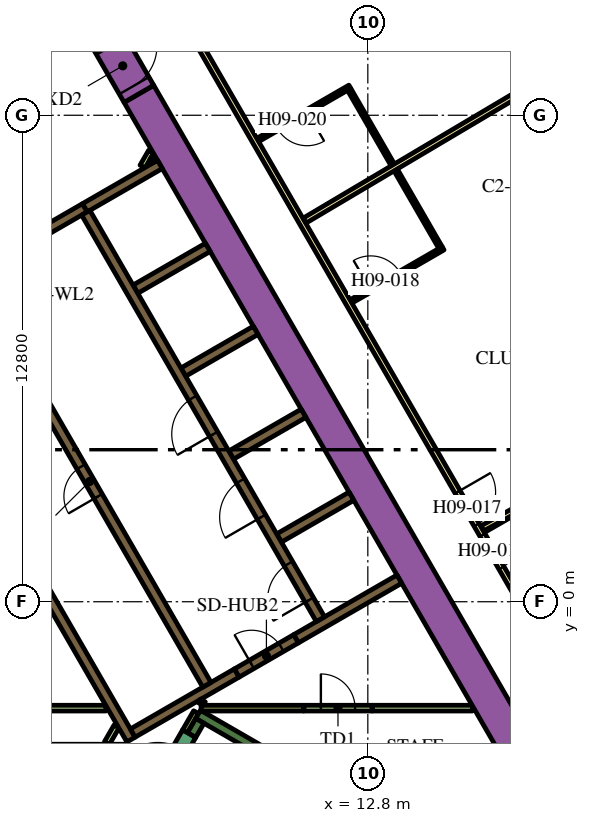
"""IFC4 building model, lengths in metres.
Left out: names, types, materials, properties, quantities, classifications, styles, units other than length and angle.
Written with IfcOpenShell. Run it as: python <this file> out.ifc"""

import sys

from ifc_helpers import new_model, si_unit, direction, frame, frame_2d, origin, place, context, subcontext, project, spatial, polyline, rectangle, outline, extrude, element, fill, save


model = new_model("IFC4")
c1 = context("Model", 3, precision=1e-05, world=origin(), true_north=direction((0.0, 1.0)))
c2 = subcontext(c1, "Body", "Model", "MODEL_VIEW")
j1 = project(units=[si_unit("LENGTHUNIT", "METRE"), si_unit("PLANEANGLEUNIT", "RADIAN")], contexts=[c1])
p1 = place(None, origin())
s1 = spatial("IfcSite", under=j1, at=p1, CompositionType="ELEMENT")
p2 = place(p1, origin())
s2 = spatial("IfcBuilding", under=s1, at=p2, CompositionType="ELEMENT")
p3 = place(p2, frame((0.0, 0.0, 126.6)))
s3 = spatial("IfcBuildingStorey", under=s2, at=p3, CompositionType="ELEMENT", Elevation=126.6)
p4 = place(p3, frame((6.776, 13.364, 0.0), z_axis=(0.0, 0.0, 1.0), x_axis=(0.500004177138, -0.8660229921, 0.0)))
e1 = element("IfcWall", 1, at=p4, inside=s3, PredefinedType="SOLIDWALL", context=c2, shape_type="SweptSolid", body=[
    extrude(rectangle(XDim=20.204, YDim=0.9, at=frame_2d((10.102, 0.0))), origin(), (0.0, 0.0, 1.0), 3.9),
])
p5 = place(p3, frame((8.334, -2.964, 0.0), z_axis=(0.0, 0.0, 1.0), x_axis=(0.866016039709, -0.500016218704, 0.0)))
e2 = element("IfcWall", 2, at=p5, inside=s3, PredefinedType="SOLIDWALL", context=c2, shape_type="SweptSolid", body=[
    extrude(rectangle(XDim=7.05, YDim=0.25, at=frame_2d((3.525, 0.0))), origin(), (0.0, 0.0, 1.0), 3.9),
])
p6 = place(p3, frame((8.163, -3.511, 0.0), z_axis=(0.0, 0.0, 1.0), x_axis=(0.500127794843, 0.865951608824, 0.0)))
e3 = element("IfcWall", 3, at=p6, inside=s3, PredefinedType="SOLIDWALL", context=c2, shape_type="SweptSolid", body=[
    extrude(rectangle(XDim=0.435, YDim=0.25, at=frame_2d((0.217, 0.0))), origin(), (0.0, 0.0, 1.0), 3.9),
])
p7 = place(p3, frame((10.464, 1.677, 0.0), z_axis=(0.0, 0.0, 1.0), x_axis=(0.86605622881, 0.499946605688, 0.0)))
e4 = element("IfcWall", 4, at=p7, inside=s3, PredefinedType="SOLIDWALL", context=c2, shape_type="SweptSolid", body=[
    extrude(rectangle(XDim=2.2, YDim=0.25, at=frame_2d((1.1, 0.0))), origin(), (0.0, 0.0, 1.0), 3.9),
])
p8 = place(p3, origin())
e5 = element("IfcWall", 5, at=p8, inside=s3, PredefinedType="SOLIDWALL", context=c2, shape_type="SweptSolid", body=[
    extrude(outline(polyline([(0.335, 6.925), (0.335, 6.925), (0.335, 7.075), (0.335, 7.075), (0.335, 7.075), (0.245, 7.075), (0.079, 7.363), (0.035, 7.439), (0.252, 7.564), (0.377, 7.348), (6.552, -3.348), (6.677, -3.564), (6.46, -3.689), (4.897, -0.981), (0.332, 6.925), (0.335, 6.925), (0.335, 6.925)])), origin(), (0.0, 0.0, 1.0), 3.9),
])
p9 = place(p3, frame((4.358, 9.791, 0.0), z_axis=(0.0, 0.0, 1.0), x_axis=(0.866079547155, 0.499906209203, 0.0)))
e6 = element("IfcWall", 6, at=p9, inside=s3, PredefinedType="SOLIDWALL", context=c2, shape_type="SweptSolid", body=[
    extrude(rectangle(XDim=1.15, YDim=0.25, at=frame_2d((0.575, 0.0))), origin(), (0.0, 0.0, 1.0), 3.9),
])
p10 = place(p3, frame((5.356, 10.367, 0.0), z_axis=(0.0, 0.0, 1.0), x_axis=(0.865978535641, 0.50008116922, 0.0)))
e7 = element("IfcWall", 7, at=p10, inside=s3, PredefinedType="SOLIDWALL", context=c2, shape_type="SweptSolid", body=[
    extrude(rectangle(XDim=2.278, YDim=0.25, at=frame_2d((1.139, 0.0))), origin(), (0.0, 0.0, 1.0), 3.9),
])
p11 = place(p3, frame((9.352, -1.875, 0.0), z_axis=(0.0, 0.0, 1.0), x_axis=(-0.866024844342, -0.500000968981, 0.0)))
e8 = element("IfcWall", 8, at=p11, inside=s3, PredefinedType="SOLIDWALL", context=c2, shape_type="SweptSolid", body=[
    extrude(rectangle(XDim=3.162, YDim=0.25, at=frame_2d((1.581, 0.0))), origin(), (0.0, 0.0, 1.0), 3.9),
])
for number, where, z_axis, x_axis in (
    (9, (6.684, 8.224, 0.0), (0.0, 0.0, 1.0), (0.866, 0.5, 0.0)),
    (10, (7.944, 6.041, 0.0), (0.0, 0.0, 1.0), (0.866, 0.5, 0.0)),
    (11, (9.204, 3.859, 0.0), (0.0, 0.0, 1.0), (0.866, 0.5, 0.0)),
):
    element("IfcWall", number, at=place(p3, frame(where, z_axis=z_axis, x_axis=x_axis)), inside=s3, PredefinedType="SOLIDWALL", context=c2, shape_type="SweptSolid", body=[
        extrude(rectangle(XDim=2.2, YDim=0.25, at=frame_2d((1.1, 0.0))), origin(), (0.0, 0.0, 1.0), 3.9),
    ])
p12 = place(p3, frame((10.911, -0.975, 0.0), z_axis=(0.0, 0.0, 1.0), x_axis=(0.866046979468, 0.499962627957, 0.0)))
e12 = element("IfcWall", 12, at=p12, inside=s3, PredefinedType="SOLIDWALL", context=c2, shape_type="SweptSolid", body=[
    extrude(rectangle(XDim=3.138, YDim=0.25, at=frame_2d((1.569, 0.0))), origin(), (0.0, 0.0, 1.0), 3.9),
])
p13 = place(p3, frame((5.936, -3.718, 0.0), z_axis=(0.0, 0.0, 1.0), x_axis=(0.499890179513, 0.866088799389, 0.0)))
e13 = element("IfcWall", 13, at=p13, inside=s3, PredefinedType="PARTITIONING", context=c2, shape_type="SweptSolid", body=[
    extrude(rectangle(XDim=0.504, YDim=0.15, at=frame_2d((0.252, 0.0))), origin(), (0.0, 0.0, 1.0), 2.75),
])
p14 = place(p3, frame((8.412, -2.8, 0.0), z_axis=(0.0, 0.0, 1.0), x_axis=(1.0, 0.0, 0.0)))
e14 = element("IfcWall", 14, at=p14, inside=s3, PredefinedType="PARTITIONING", context=c2, shape_type="SweptSolid", body=[
    extrude(rectangle(XDim=2.702, YDim=0.15, at=frame_2d((1.351, 0.0))), origin(), (0.0, 0.0, 1.0), 3.9),
])
p15 = place(p3, frame((8.459, -2.599, 0.0), z_axis=(0.0, 0.0, 1.0), x_axis=(-0.501919277433, -0.864914469148, 0.0)))
e15 = element("IfcWall", 15, at=p15, inside=s3, PredefinedType="PARTITIONING", context=c2, shape_type="SweptSolid", body=[
    extrude(rectangle(XDim=0.109, YDim=0.15, at=frame_2d((0.054, 0.0))), origin(), (0.0, 0.0, 1.0), 3.9),
])
p16 = place(p3, frame((8.281, -2.907, 0.0), z_axis=(0.0, 0.0, 1.0), x_axis=(-0.500193841991, -0.86591346013, 0.0)))
e16 = element("IfcWall", 16, at=p16, inside=s3, PredefinedType="PARTITIONING", context=c2, shape_type="SweptSolid", body=[
    extrude(rectangle(XDim=0.583, YDim=0.15, at=frame_2d((0.292, 0.0))), origin(), (0.0, 0.0, 1.0), 3.9),
])
p17 = place(p3, frame((3.238, -2.8, 0.0), z_axis=(0.0, 0.0, 1.0), x_axis=(1.0, 0.0, 0.0)))
e17 = element("IfcWall", 17, at=p17, inside=s3, PredefinedType="PARTITIONING", context=c2, shape_type="SweptSolid", body=[
    extrude(rectangle(XDim=2.672, YDim=0.15, at=frame_2d((1.336, 0.0))), origin(), (0.0, 0.0, 1.0), 2.75),
])
p18 = place(p3, frame((12.915, -2.8, 0.0), z_axis=(0.0, 0.0, 1.0), x_axis=(1.0, 0.0, 0.0)))
e18 = element("IfcWall", 18, at=p18, inside=s3, PredefinedType="PARTITIONING", context=c2, shape_type="SweptSolid", body=[
    extrude(rectangle(XDim=2.637, YDim=0.15, at=frame_2d((1.318, 0.0))), origin(), (0.0, 0.0, 1.0), 2.75),
])
p19 = place(p3, frame((6.872, 11.45, 0.0), z_axis=(0.0, 0.0, 1.0), x_axis=(0.499846793097, 0.866113839764, 0.0)))
e19 = element("IfcWall", 19, at=p19, inside=s3, PredefinedType="PARTITIONING", context=c2, shape_type="SweptSolid", body=[
    extrude(rectangle(XDim=0.453, YDim=0.15, at=frame_2d((0.227, 0.0))), origin(), (0.0, 0.0, 1.0), 2.75),
])
p20 = place(p3, frame((7.131, 11.6, 0.0), z_axis=(0.0, 0.0, 1.0), x_axis=(0.498600033135, 0.866832167699, 0.0)))
e20 = element("IfcWall", 20, at=p20, inside=s3, PredefinedType="PARTITIONING", context=c2, shape_type="SweptSolid", body=[
    extrude(rectangle(XDim=0.107, YDim=0.15, at=frame_2d((0.053, 0.0))), origin(), (0.0, 0.0, 1.0), 2.75),
])
p21 = place(p3, frame((11.553, -0.46, 0.0), z_axis=(0.0, 0.0, 1.0), x_axis=(-0.500006514828, 0.866021642414, 0.0)))
e21 = element("IfcWall", 21, at=p21, inside=s3, PredefinedType="SOLIDWALL", context=c2, shape_type="SweptSolid", body=[
    extrude(rectangle(XDim=12.35, YDim=0.25, at=frame_2d((6.175, 0.0))), origin(), (0.0, 0.0, 1.0), 3.9),
])
p22 = place(p21, frame((0.585, 0.0, 0.0)))
e22 = element("IfcOpeningElement", 22, at=p22, cuts=e21, PredefinedType="OPENING", context=c2, shape_type="SweptSolid", body=[
    extrude(rectangle(XDim=1.1, YDim=2.1, at=frame_2d((0.55, 1.05))), frame((0.0, 0.135, 0.0), z_axis=(0.0, -1.0, 0.0), x_axis=(1.0, 0.0, 0.0)), (0.0, 0.0, 1.0), 0.27),
])
p23 = place(p21, frame((3.105, 0.0, 0.0)))
e23 = element("IfcOpeningElement", 23, at=p23, cuts=e21, PredefinedType="OPENING", context=c2, shape_type="SweptSolid", body=[
    extrude(rectangle(XDim=1.1, YDim=2.1, at=frame_2d((0.55, 1.05))), frame((0.0, 0.135, 0.0), z_axis=(0.0, -1.0, 0.0), x_axis=(1.0, 0.0, 0.0)), (0.0, 0.0, 1.0), 0.27),
])
p24 = place(p21, frame((5.625, 0.0, 0.0)))
e24 = element("IfcOpeningElement", 24, at=p24, cuts=e21, PredefinedType="OPENING", context=c2, shape_type="SweptSolid", body=[
    extrude(rectangle(XDim=1.1, YDim=2.1, at=frame_2d((0.55, 1.05))), frame((0.0, 0.135, 0.0), z_axis=(0.0, -1.0, 0.0), x_axis=(1.0, 0.0, 0.0)), (0.0, 0.0, 1.0), 0.27),
])
p25 = place(p3, frame((8.565, -2.185, 0.0), z_axis=(0.0, 0.0, 1.0), x_axis=(-0.499997954832, 0.866026584559, 0.0)))
e25 = element("IfcWall", 25, at=p25, inside=s3, PredefinedType="SOLIDWALL", context=c2, shape_type="SweptSolid", body=[
    extrude(rectangle(XDim=12.35, YDim=0.25, at=frame_2d((6.175, 0.0))), origin(), (0.0, 0.0, 1.0), 3.9),
])
p26 = place(p25, frame((5.725, 0.0, 0.0)))
e26 = element("IfcOpeningElement", 26, at=p26, cuts=e25, PredefinedType="OPENING", context=c2, shape_type="SweptSolid", body=[
    extrude(rectangle(XDim=0.9, YDim=2.1, at=frame_2d((0.45, 1.05))), frame((0.0, 0.135, 0.0), z_axis=(0.0, -1.0, 0.0), x_axis=(1.0, 0.0, 0.0)), (0.0, 0.0, 1.0), 0.27),
])
p27 = place(p3, frame((7.048, -5.292, 0.0), z_axis=(0.0, 0.0, 1.0), x_axis=(0.49994051562, 0.866059744384, 0.0)))
e27 = element("IfcWall", 27, at=p27, inside=s3, PredefinedType="SOLIDWALL", context=c2, shape_type="SweptSolid", body=[
    extrude(rectangle(XDim=2.1, YDim=0.4, at=frame_2d((1.05, 0.0))), origin(), (0.0, 0.0, 1.0), 3.9),
])
p28 = place(p27, frame((0.45, 0.0, 0.0)))
e28 = element("IfcOpeningElement", 28, at=p28, cuts=e27, PredefinedType="OPENING", context=c2, shape_type="SweptSolid", body=[
    extrude(rectangle(XDim=1.2, YDim=2.1, at=frame_2d((0.6, 1.05))), frame((0.0, 0.21, 0.0), z_axis=(0.0, -1.0, 0.0), x_axis=(1.0, 0.0, 0.0)), (0.0, 0.0, 1.0), 0.42),
])
p29 = place(p3, frame((5.926, 14.836, 0.0), z_axis=(0.0, 0.0, 1.0), x_axis=(0.500062241894, -0.865989465428, 0.0)))
e29 = element("IfcWall", 29, at=p29, inside=s3, PredefinedType="SOLIDWALL", context=c2, shape_type="SweptSolid", body=[
    extrude(rectangle(XDim=1.7, YDim=0.9, at=frame_2d((0.85, 0.0))), origin(), (0.0, 0.0, 1.0), 3.9),
])
p30 = place(p29, frame((0.25, 0.0, 0.0)))
e30 = element("IfcOpeningElement", 30, at=p30, cuts=e29, PredefinedType="OPENING", context=c2, shape_type="SweptSolid", body=[
    extrude(rectangle(XDim=1.2, YDim=2.1, at=frame_2d((0.6, 1.05))), frame((0.0, 0.46, 0.0), z_axis=(0.0, -1.0, 0.0), x_axis=(1.0, 0.0, 0.0)), (0.0, 0.0, 1.0), 0.92),
])
p31 = place(p3, frame((9.352, -1.875, 0.0), z_axis=(0.0, 0.0, 1.0), x_axis=(0.865989075817, 0.500062916607, 0.0)))
e31 = element("IfcWall", 31, at=p31, inside=s3, PredefinedType="SOLIDWALL", context=c2, shape_type="SweptSolid", body=[
    extrude(rectangle(XDim=1.8, YDim=0.25, at=frame_2d((0.9, 0.0))), origin(), (0.0, 0.0, 1.0), 3.9),
])
p32 = place(p31, frame((0.45, 0.0, 0.0)))
e32 = element("IfcOpeningElement", 32, at=p32, cuts=e31, PredefinedType="OPENING", context=c2, shape_type="SweptSolid", body=[
    extrude(rectangle(XDim=0.9, YDim=2.1, at=frame_2d((0.45, 1.05))), frame((0.0, 0.135, 0.0), z_axis=(0.0, -1.0, 0.0), x_axis=(1.0, 0.0, 0.0)), (0.0, 0.0, 1.0), 0.27),
])
p33 = place(p3, frame((11.115, -2.8, 0.0), z_axis=(0.0, 0.0, 1.0), x_axis=(1.0, 0.0, 0.0)))
e33 = element("IfcWall", 33, at=p33, inside=s3, PredefinedType="PARTITIONING", context=c2, shape_type="SweptSolid", body=[
    extrude(rectangle(XDim=1.8, YDim=0.15, at=frame_2d((0.9, 0.0))), origin(), (0.0, 0.0, 1.0), 2.75),
])
p34 = place(p33, frame((0.45, 0.0, 0.0)))
e34 = element("IfcOpeningElement", 34, at=p34, cuts=e33, PredefinedType="OPENING", context=c2, shape_type="SweptSolid", body=[
    extrude(rectangle(XDim=0.9, YDim=2.1, at=frame_2d((0.45, 1.05))), frame((0.0, 0.085, 0.0), z_axis=(0.0, -1.0, 0.0), x_axis=(1.0, 0.0, 0.0)), (0.0, 0.0, 1.0), 0.17),
])
p35 = place(p3, frame((6.163, 18.475, 0.0), z_axis=(0.0, 0.0, 1.0), x_axis=(0.500001317485, -0.866024643133, 0.0)))
e35 = element("IfcWall", 35, at=p35, inside=s3, PredefinedType="PARTITIONING", context=c2, shape_type="SweptSolid", body=[
    extrude(rectangle(XDim=25.767, YDim=0.15, at=frame_2d((12.883, 0.0))), origin(), (0.0, 0.0, 1.0), 2.75),
])
p36 = place(p35, frame((19.306, 0.0, 0.0)))
e36 = element("IfcOpeningElement", 36, at=p36, cuts=e35, PredefinedType="OPENING", context=c2, shape_type="SweptSolid", body=[
    extrude(rectangle(XDim=1.0, YDim=2.1, at=frame_2d((0.5, 1.05))), frame((0.0, 0.085, 0.0), z_axis=(0.0, -1.0, 0.0), x_axis=(1.0, 0.0, 0.0)), (0.0, 0.0, 1.0), 0.17),
])
p37 = place(p35, frame((17.999, 0.0, 0.0)))
e37 = element("IfcOpeningElement", 37, at=p37, cuts=e35, PredefinedType="OPENING", context=c2, shape_type="SweptSolid", body=[
    extrude(rectangle(XDim=1.0, YDim=2.1, at=frame_2d((0.5, 1.05))), frame((0.0, 0.085, 0.0), z_axis=(0.0, -1.0, 0.0), x_axis=(1.0, 0.0, 0.0)), (0.0, 0.0, 1.0), 0.17),
])
p38 = place(p35, frame((0.596, 0.0, 0.0)))
e38 = element("IfcOpeningElement", 38, at=p38, cuts=e35, PredefinedType="OPENING", context=c2, shape_type="SweptSolid", body=[
    extrude(rectangle(XDim=1.0, YDim=2.1, at=frame_2d((0.5, 1.05))), frame((0.0, 0.085, 0.0), z_axis=(0.0, -1.0, 0.0), x_axis=(1.0, 0.0, 0.0)), (0.0, 0.0, 1.0), 0.17),
])
p39 = place(p3, frame((17.379, 13.731, 0.0), z_axis=(0.0, 0.0, 1.0), x_axis=(-0.860132461691, -0.510070728768, 0.0)))
e39 = element("IfcWall", 39, at=p39, inside=s3, PredefinedType="PARTITIONING", context=c2, shape_type="SweptSolid", body=[
    extrude(rectangle(XDim=7.257, YDim=0.15, at=frame_2d((3.628, 0.0))), origin(), (0.0, 0.0, 1.0), 2.75),
])
p40 = place(p3, frame((21.614, 5.102, 0.0), z_axis=(0.0, 0.0, 1.0), x_axis=(-0.877484555087, -0.479604895287, 0.0)))
e40 = element("IfcWall", 40, at=p40, inside=s3, PredefinedType="PARTITIONING", context=c2, shape_type="SweptSolid", body=[
    extrude(rectangle(XDim=6.611, YDim=0.15, at=frame_2d((3.306, 0.0))), origin(), (0.0, 0.0, 1.0), 2.75),
])
p41 = place(p3, frame((12.355, 7.9, 0.0), z_axis=(0.0, 0.0, 1.0), x_axis=(0.866034573852, 0.49998411664, 0.0)))
e41 = element("IfcWall", 41, at=p41, inside=s3, PredefinedType="PARTITIONING", context=c2, shape_type="SweptSolid", body=[
    extrude(rectangle(XDim=2.8, YDim=0.1, at=frame_2d((1.4, 0.0))), origin(), (0.0, 0.0, 1.0), 2.75),
])
p42 = place(p41, frame((0.6, 0.0, 0.0)))
e42 = element("IfcOpeningElement", 42, at=p42, cuts=e41, PredefinedType="OPENING", context=c2, shape_type="SweptSolid", body=[
    extrude(rectangle(XDim=0.9, YDim=2.1, at=frame_2d((0.45, 1.05))), frame((0.0, 0.06, 0.0), z_axis=(0.0, -1.0, 0.0), x_axis=(1.0, 0.0, 0.0)), (0.0, 0.0, 1.0), 0.12),
])
p43 = place(p3, frame((14.712, 9.318, 0.0), z_axis=(0.0, 0.0, 1.0), x_axis=(-0.50000006957, 0.866025363618, 0.0)))
e43 = element("IfcWall", 43, at=p43, inside=s3, PredefinedType="PARTITIONING", context=c2, shape_type="SweptSolid", body=[
    extrude(rectangle(XDim=2.36, YDim=0.1, at=frame_2d((1.18, 0.0))), origin(), (0.0, 0.0, 1.0), 2.75),
])
p44 = place(p3, frame((12.327, 13.549, 0.0), z_axis=(0.0, 0.0, 1.0), x_axis=(-0.866056369097, -0.49994636267, 0.0)))
e44 = element("IfcWall", 44, at=p44, inside=s3, PredefinedType="PARTITIONING", context=c2, shape_type="SweptSolid", body=[
    extrude(rectangle(XDim=2.8, YDim=0.1, at=frame_2d((1.4, 0.0))), origin(), (0.0, 0.0, 1.0), 2.75),
])
p45 = place(p44, frame((1.3, 0.0, 0.0)))
e45 = element("IfcOpeningElement", 45, at=p45, cuts=e44, PredefinedType="OPENING", context=c2, shape_type="SweptSolid", body=[
    extrude(rectangle(XDim=0.9, YDim=2.1, at=frame_2d((0.45, 1.05))), frame((0.0, 0.06, 0.0), z_axis=(0.0, -1.0, 0.0), x_axis=(1.0, 0.0, 0.0)), (0.0, 0.0, 1.0), 0.12),
])
p46 = place(p3, frame((12.309, 13.481, 0.0), z_axis=(0.0, 0.0, 1.0), x_axis=(0.499968531483, -0.866043571379, 0.0)))
e46 = element("IfcWall", 46, at=p46, inside=s3, PredefinedType="PARTITIONING", context=c2, shape_type="SweptSolid", body=[
    extrude(rectangle(XDim=2.29, YDim=0.1, at=frame_2d((1.145, 0.0))), origin(), (0.0, 0.0, 1.0), 2.75),
])
p47 = place(p3, frame((18.805, 11.611, 0.0), z_axis=(0.0, 0.0, 1.0), x_axis=(-0.510054281659, 0.860142214847, 0.0)))
e47 = element("IfcWall", 47, at=p47, inside=s3, PredefinedType="SOLIDWALL", context=c2, shape_type="SweptSolid", body=[
    extrude(rectangle(XDim=5.101, YDim=0.29, at=frame_2d((2.55, 0.0))), origin(), (0.0, 0.0, 1.0), 3.65),
])
p48 = place(p47, frame((0.273, 0.0, 0.9)))
e48 = element("IfcOpeningElement", 48, at=p48, cuts=e47, PredefinedType="OPENING", context=c2, shape_type="SweptSolid", body=[
    extrude(rectangle(XDim=1.35, YDim=2.15, at=frame_2d((0.675, 1.075))), frame((0.0, 0.155, 0.0), z_axis=(0.0, -1.0, 0.0), x_axis=(1.0, 0.0, 0.0)), (0.0, 0.0, 1.0), 0.31),
])
p49 = place(p47, frame((3.478, 0.0, 0.9)))
e49 = element("IfcOpeningElement", 49, at=p49, cuts=e47, PredefinedType="OPENING", context=c2, shape_type="SweptSolid", body=[
    extrude(rectangle(XDim=1.35, YDim=2.15, at=frame_2d((0.675, 1.075))), frame((0.0, 0.155, 0.0), z_axis=(0.0, -1.0, 0.0), x_axis=(1.0, 0.0, 0.0)), (0.0, 0.0, 1.0), 0.31),
])
p50 = place(p22, origin())
e50 = element("IfcDoor", 50, at=p50, inside=s3, OperationType="DOUBLE_DOOR_SLIDING", PredefinedType="DOOR", context=c2, shape_type="SweptSolid", body=[
    extrude(rectangle(XDim=1.1, YDim=2.1, at=frame_2d((0.55, 1.05))), frame((0.0, 0.025, 0.0), z_axis=(0.0, -1.0, 0.0), x_axis=(1.0, 0.0, 0.0)), (0.0, 0.0, 1.0), 0.05),
])
fill(e22, e50)
p51 = place(p23, origin())
e51 = element("IfcDoor", 51, at=p51, inside=s3, OperationType="DOUBLE_DOOR_SLIDING", PredefinedType="DOOR", context=c2, shape_type="SweptSolid", body=[
    extrude(rectangle(XDim=1.1, YDim=2.1, at=frame_2d((0.55, 1.05))), frame((0.0, 0.025, 0.0), z_axis=(0.0, -1.0, 0.0), x_axis=(1.0, 0.0, 0.0)), (0.0, 0.0, 1.0), 0.05),
])
fill(e23, e51)
p52 = place(p24, origin())
e52 = element("IfcDoor", 52, at=p52, inside=s3, OperationType="DOUBLE_DOOR_SLIDING", PredefinedType="DOOR", context=c2, shape_type="SweptSolid", body=[
    extrude(rectangle(XDim=1.1, YDim=2.1, at=frame_2d((0.55, 1.05))), frame((0.0, 0.025, 0.0), z_axis=(0.0, -1.0, 0.0), x_axis=(1.0, 0.0, 0.0)), (0.0, 0.0, 1.0), 0.05),
])
fill(e24, e52)
p53 = place(p26, origin())
e53 = element("IfcDoor", 53, at=p53, inside=s3, OperationType="SINGLE_SWING_LEFT", PredefinedType="DOOR", context=c2, shape_type="SweptSolid", body=[
    extrude(rectangle(XDim=0.9, YDim=2.1, at=frame_2d((0.45, 1.05))), frame((0.0, 0.025, 0.0), z_axis=(0.0, -1.0, 0.0), x_axis=(1.0, 0.0, 0.0)), (0.0, 0.0, 1.0), 0.05),
])
fill(e26, e53)
p54 = place(p30, origin())
e54 = element("IfcDoor", 54, at=p54, inside=s3, OperationType="SINGLE_SWING_LEFT", PredefinedType="DOOR", context=c2, shape_type="SweptSolid", body=[
    extrude(rectangle(XDim=1.2, YDim=2.1, at=frame_2d((0.6, 1.05))), frame((0.0, 0.025, 0.0), z_axis=(0.0, -1.0, 0.0), x_axis=(1.0, 0.0, 0.0)), (0.0, 0.0, 1.0), 0.05),
])
fill(e30, e54)
p55 = place(p32, origin())
e55 = element("IfcDoor", 55, at=p55, inside=s3, OperationType="SINGLE_SWING_LEFT", PredefinedType="DOOR", context=c2, shape_type="SweptSolid", body=[
    extrude(rectangle(XDim=0.9, YDim=2.1, at=frame_2d((0.45, 1.05))), frame((0.0, 0.025, 0.0), z_axis=(0.0, -1.0, 0.0), x_axis=(1.0, 0.0, 0.0)), (0.0, 0.0, 1.0), 0.05),
])
fill(e32, e55)
p56 = place(p34, origin())
e56 = element("IfcDoor", 56, at=p56, inside=s3, OperationType="SINGLE_SWING_LEFT", PredefinedType="DOOR", context=c2, shape_type="SweptSolid", body=[
    extrude(rectangle(XDim=0.9, YDim=2.1, at=frame_2d((0.45, 1.05))), frame((0.0, 0.025, 0.0), z_axis=(0.0, -1.0, 0.0), x_axis=(1.0, 0.0, 0.0)), (0.0, 0.0, 1.0), 0.05),
])
fill(e34, e56)
p57 = place(p36, origin())
e57 = element("IfcDoor", 57, at=p57, inside=s3, OperationType="SINGLE_SWING_LEFT", PredefinedType="DOOR", context=c2, shape_type="SweptSolid", body=[
    extrude(rectangle(XDim=1.0, YDim=2.1, at=frame_2d((0.5, 1.05))), frame((0.0, 0.025, 0.0), z_axis=(0.0, -1.0, 0.0), x_axis=(1.0, 0.0, 0.0)), (0.0, 0.0, 1.0), 0.05),
])
fill(e36, e57)
p58 = place(p37, origin())
e58 = element("IfcDoor", 58, at=p58, inside=s3, OperationType="SINGLE_SWING_RIGHT", PredefinedType="DOOR", context=c2, shape_type="SweptSolid", body=[
    extrude(rectangle(XDim=1.0, YDim=2.1, at=frame_2d((0.5, 1.05))), frame((0.0, 0.025, 0.0), z_axis=(0.0, -1.0, 0.0), x_axis=(1.0, 0.0, 0.0)), (0.0, 0.0, 1.0), 0.05),
])
fill(e37, e58)
p59 = place(p42, origin())
e59 = element("IfcDoor", 59, at=p59, inside=s3, OperationType="SINGLE_SWING_RIGHT", PredefinedType="DOOR", context=c2, shape_type="SweptSolid", body=[
    extrude(rectangle(XDim=0.9, YDim=2.1, at=frame_2d((0.45, 1.05))), frame((0.0, 0.025, 0.0), z_axis=(0.0, -1.0, 0.0), x_axis=(1.0, 0.0, 0.0)), (0.0, 0.0, 1.0), 0.05),
])
fill(e42, e59)
p60 = place(p45, origin())
e60 = element("IfcDoor", 60, at=p60, inside=s3, OperationType="SINGLE_SWING_LEFT", PredefinedType="DOOR", context=c2, shape_type="SweptSolid", body=[
    extrude(rectangle(XDim=0.9, YDim=2.1, at=frame_2d((0.45, 1.05))), frame((0.0, 0.025, 0.0), z_axis=(0.0, -1.0, 0.0), x_axis=(1.0, 0.0, 0.0)), (0.0, 0.0, 1.0), 0.05),
])
fill(e45, e60)
save(model, sys.argv[1])
